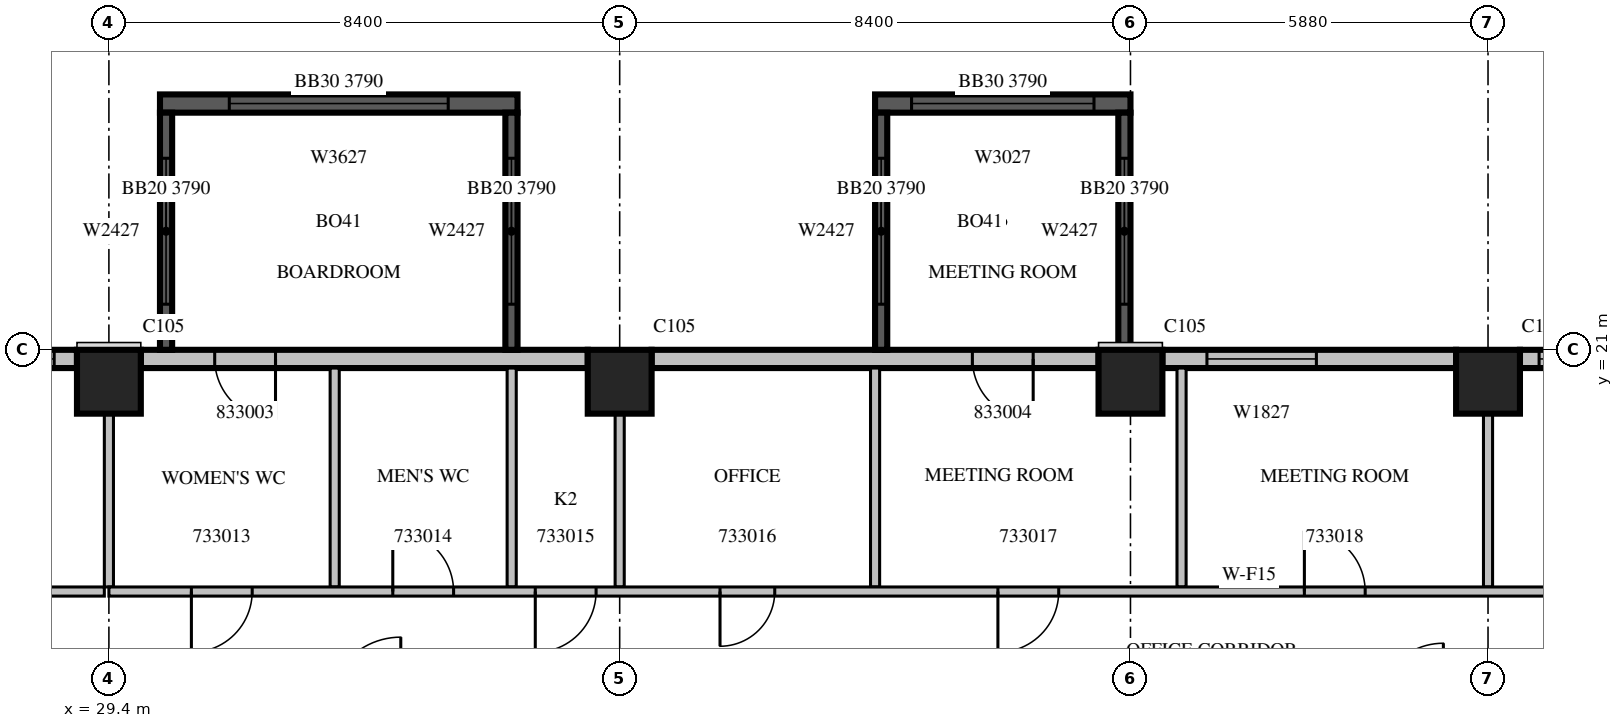
"""IFC4 building model, lengths in metres.
Left out: names, types, materials, properties, quantities, classifications, styles, units other than length and angle.
Written with IfcOpenShell. Run it as: python <this file> out.ifc"""

import sys

from ifc_helpers import new_model, si_unit, direction, frame, frame_2d, origin, origin_2d, place, context, subcontext, project, spatial, rectangle, extrude, source, transform, mapped, element, fill, save


model = new_model("IFC4")
c1 = context("Model", 3, precision=1e-05, world=origin(), true_north=direction((0.0, 1.0)))
c2 = subcontext(c1, "Body", "Model", "MODEL_VIEW")
j1 = project(units=[si_unit("LENGTHUNIT", "METRE"), si_unit("PLANEANGLEUNIT", "RADIAN")], contexts=[c1])
p1 = place(None, origin())
s1 = spatial("IfcSite", under=j1, at=p1, CompositionType="ELEMENT")
p2 = place(p1, origin())
s2 = spatial("IfcBuilding", under=s1, at=p2, CompositionType="ELEMENT")
p3 = place(p2, frame((0.0, 0.0, 149.7)))
s3 = spatial("IfcBuildingStorey", under=s2, at=p3, CompositionType="ELEMENT", Elevation=149.7)
m1 = source(origin(), c2, "Body", "SweptSolid", [
    extrude(rectangle(XDim=1.05, YDim=1.05, at=origin_2d()), origin(), (0.0, 0.0, 1.0), 4.2),
])
for number, where, z_axis, x_axis in (
    (1, (29.4, 20.475, 0.0), (0.0, 0.0, 1.0), (1.0, 0.0, 0.0)),
    (2, (37.8, 20.475, 0.0), (0.0, 0.0, 1.0), (1.0, 0.0, 0.0)),
    (3, (46.2, 20.475, 0.0), (0.0, 0.0, 1.0), (1.0, 0.0, 0.0)),
    (4, (52.08, 20.475, 0.0), (0.0, 0.0, 1.0), (1.0, 0.0, 0.0)),
):
    element("IfcColumn", number, at=place(p3, frame(where, z_axis=z_axis, x_axis=x_axis)), inside=s3, PredefinedType="COLUMN", context=c2, shape_type="MappedRepresentation", body=[
        mapped(m1, transform((0.0, 0.0, 0.0), scale=1.0)),
    ])
m2 = source(origin(), c2, "Body", "SweptSolid", [
    extrude(rectangle(XDim=4.83, YDim=0.3, at=frame_2d((2.415, 0.0))), origin(), (0.0, 0.0, 1.0), 3.8),
])
p4 = place(p3, frame((57.435, 20.85, 0.0), z_axis=(0.0, 0.0, 1.0), x_axis=(-1.0, 0.0, 0.0)))
e5 = element("IfcWall", 5, at=p4, inside=s3, PredefinedType="STANDARD", context=c2, shape_type="MappedRepresentation", body=[
    mapped(m2, transform((0.0, 0.0, 0.0), scale=1.0)),
])
m3 = source(origin(), c2, "Body", "SweptSolid", [
    extrude(rectangle(XDim=4.2, YDim=2.7, at=frame_2d((2.1, 1.35))), frame((0.0, 0.16, 0.0), z_axis=(0.0, -1.0, 0.0), x_axis=(1.0, 0.0, 0.0)), (0.0, 0.0, 1.0), 0.32),
])
p5 = place(p4, frame((0.315, 0.0, 0.6)))
e6 = element("IfcOpeningElement", 6, at=p5, cuts=e5, PredefinedType="OPENING", context=c2, shape_type="MappedRepresentation", body=[
    mapped(m3, transform((0.0, 0.0, 0.0), scale=1.0)),
])
p6 = place(p3, frame((51.555, 20.85, 0.0), z_axis=(0.0, 0.0, 1.0), x_axis=(-1.0, 0.0, 0.0)))
e7 = element("IfcWall", 7, at=p6, inside=s3, PredefinedType="STANDARD", context=c2, shape_type="MappedRepresentation", body=[
    mapped(m2, transform((0.0, 0.0, 0.0), scale=1.0)),
])
m4 = source(origin(), c2, "Body", "SweptSolid", [
    extrude(rectangle(XDim=1.8, YDim=2.7, at=frame_2d((0.9, 1.35))), frame((0.0, 0.16, 0.0), z_axis=(0.0, -1.0, 0.0), x_axis=(1.0, 0.0, 0.0)), (0.0, 0.0, 1.0), 0.32),
])
p7 = place(p6, frame((2.297, 0.0, 0.6)))
e8 = element("IfcOpeningElement", 8, at=p7, cuts=e7, PredefinedType="OPENING", context=c2, shape_type="MappedRepresentation", body=[
    mapped(m4, transform((0.0, 0.0, 0.0), scale=1.0)),
])
m5 = source(origin(), c2, "Body", "SweptSolid", [
    extrude(rectangle(XDim=7.35, YDim=0.3, at=frame_2d((3.675, 0.0))), origin(), (0.0, 0.0, 1.0), 3.8),
])
p8 = place(p3, frame((45.675, 20.85, 0.0), z_axis=(0.0, 0.0, 1.0), x_axis=(-1.0, 0.0, 0.0)))
e9 = element("IfcWall", 9, at=p8, inside=s3, PredefinedType="STANDARD", context=c2, shape_type="MappedRepresentation", body=[
    mapped(m5, transform((0.0, 0.0, 0.0), scale=1.0)),
])
m6 = source(origin(), c2, "Body", "SweptSolid", [
    extrude(rectangle(XDim=1.0, YDim=2.1, at=frame_2d((0.5, 1.05))), frame((0.0, 0.16, 0.0), z_axis=(0.0, -1.0, 0.0), x_axis=(1.0, 0.0, 0.0)), (0.0, 0.0, 1.0), 0.32),
])
p9 = place(p8, frame((1.075, 0.0, 0.0)))
e10 = element("IfcOpeningElement", 10, at=p9, cuts=e9, PredefinedType="OPENING", context=c2, shape_type="MappedRepresentation", body=[
    mapped(m6, transform((0.0, 0.0, 0.0), scale=1.0)),
])
p10 = place(p3, frame((37.275, 20.85, 0.0), z_axis=(0.0, 0.0, 1.0), x_axis=(-1.0, 0.0, 0.0)))
e11 = element("IfcWall", 11, at=p10, inside=s3, PredefinedType="STANDARD", context=c2, shape_type="MappedRepresentation", body=[
    mapped(m5, transform((0.0, 0.0, 0.0), scale=1.0)),
])
p11 = place(p10, frame((5.135, 0.0, 0.0)))
e12 = element("IfcOpeningElement", 12, at=p11, cuts=e11, PredefinedType="OPENING", context=c2, shape_type="MappedRepresentation", body=[
    mapped(m6, transform((0.0, 0.0, 0.0), scale=1.0)),
])
m7 = source(origin(), c2, "Body", "SweptSolid", [
    extrude(rectangle(XDim=6.875, YDim=0.3, at=frame_2d((3.438, 0.0))), origin(), (0.0, 0.0, 1.0), 3.8),
])
p12 = place(p3, frame((28.875, 20.85, 0.0), z_axis=(0.0, 0.0, 1.0), x_axis=(-1.0, 0.0, 0.0)))
e13 = element("IfcWall", 13, at=p12, inside=s3, PredefinedType="STANDARD", context=c2, shape_type="MappedRepresentation", body=[
    mapped(m7, transform((0.0, 0.0, 0.0), scale=1.0)),
])
m8 = source(origin(), c2, "Body", "SweptSolid", [
    extrude(rectangle(XDim=2.4, YDim=2.7, at=frame_2d((1.2, 1.35))), frame((0.0, 0.16, 0.0), z_axis=(0.0, -1.0, 0.0), x_axis=(1.0, 0.0, 0.0)), (0.0, 0.0, 1.0), 0.32),
])
p13 = place(p12, frame((0.375, 0.0, 0.6)))
e14 = element("IfcOpeningElement", 14, at=p13, cuts=e13, PredefinedType="OPENING", context=c2, shape_type="MappedRepresentation", body=[
    mapped(m8, transform((0.0, 0.0, 0.0), scale=1.0)),
])
m9 = source(origin(), c2, "Body", "SweptSolid", [
    extrude(rectangle(XDim=5.88, YDim=0.3, at=frame_2d((2.94, 0.0))), origin(), (0.0, 0.0, 1.0), 3.79),
])
p14 = place(p3, frame((36.12, 25.05, 0.0), z_axis=(0.0, 0.0, 1.0), x_axis=(-1.0, 0.0, 0.0)))
e15 = element("IfcWall", 15, at=p14, inside=s3, PredefinedType="SOLIDWALL", context=c2, shape_type="MappedRepresentation", body=[
    mapped(m9, transform((0.0, 0.0, 0.0), scale=1.0)),
])
m10 = source(origin(), c2, "Body", "SweptSolid", [
    extrude(rectangle(XDim=3.6, YDim=2.7, at=frame_2d((1.8, 1.35))), frame((0.0, 0.16, 0.0), z_axis=(0.0, -1.0, 0.0), x_axis=(1.0, 0.0, 0.0)), (0.0, 0.0, 1.0), 0.32),
])
p15 = place(p14, frame((1.14, 0.0, 0.6)))
e16 = element("IfcOpeningElement", 16, at=p15, cuts=e15, PredefinedType="OPENING", context=c2, shape_type="MappedRepresentation", body=[
    mapped(m10, transform((0.0, 0.0, 0.0), scale=1.0)),
])
m11 = source(origin(), c2, "Body", "SweptSolid", [
    extrude(rectangle(XDim=3.9, YDim=0.2, at=frame_2d((1.95, 0.0))), origin(), (0.0, 0.0, 1.0), 3.79),
])
p16 = place(p3, frame((36.02, 21.0, 0.0), z_axis=(0.0, 0.0, 1.0), x_axis=(0.0, 1.0, 0.0)))
e17 = element("IfcWall", 17, at=p16, inside=s3, PredefinedType="SOLIDWALL", context=c2, shape_type="MappedRepresentation", body=[
    mapped(m11, transform((0.0, 0.0, 0.0), scale=1.0)),
])
m12 = source(origin(), c2, "Body", "SweptSolid", [
    extrude(rectangle(XDim=2.4, YDim=2.7, at=frame_2d((1.2, 1.35))), frame((0.0, 0.11, 0.0), z_axis=(0.0, -1.0, 0.0), x_axis=(1.0, 0.0, 0.0)), (0.0, 0.0, 1.0), 0.22),
])
p17 = place(p16, frame((0.75, 0.0, 0.6)))
e18 = element("IfcOpeningElement", 18, at=p17, cuts=e17, PredefinedType="OPENING", context=c2, shape_type="MappedRepresentation", body=[
    mapped(m12, transform((0.0, 0.0, 0.0), scale=1.0)),
])
p18 = place(p3, frame((30.34, 21.0, 0.0), z_axis=(0.0, 0.0, 1.0), x_axis=(0.0, 1.0, 0.0)))
e19 = element("IfcWall", 19, at=p18, inside=s3, PredefinedType="SOLIDWALL", context=c2, shape_type="MappedRepresentation", body=[
    mapped(m11, transform((0.0, 0.0, 0.0), scale=1.0)),
])
p19 = place(p18, frame((0.75, 0.0, 0.6)))
e20 = element("IfcOpeningElement", 20, at=p19, cuts=e19, PredefinedType="OPENING", context=c2, shape_type="MappedRepresentation", body=[
    mapped(m12, transform((0.0, 0.0, 0.0), scale=1.0)),
])
m13 = source(origin(), c2, "Body", "SweptSolid", [
    extrude(rectangle(XDim=4.2, YDim=0.3, at=frame_2d((2.1, 0.0))), origin(), (0.0, 0.0, 1.0), 3.79),
])
p20 = place(p3, frame((46.2, 25.05, 0.0), z_axis=(0.0, 0.0, 1.0), x_axis=(-1.0, 0.0, 0.0)))
e21 = element("IfcWall", 21, at=p20, inside=s3, PredefinedType="SOLIDWALL", context=c2, shape_type="MappedRepresentation", body=[
    mapped(m13, transform((0.0, 0.0, 0.0), scale=1.0)),
])
m14 = source(origin(), c2, "Body", "SweptSolid", [
    extrude(rectangle(XDim=3.0, YDim=2.7, at=frame_2d((1.5, 1.35))), frame((0.0, 0.16, 0.0), z_axis=(0.0, -1.0, 0.0), x_axis=(1.0, 0.0, 0.0)), (0.0, 0.0, 1.0), 0.32),
])
p21 = place(p20, frame((0.6, 0.0, 0.6)))
e22 = element("IfcOpeningElement", 22, at=p21, cuts=e21, PredefinedType="OPENING", context=c2, shape_type="MappedRepresentation", body=[
    mapped(m14, transform((0.0, 0.0, 0.0), scale=1.0)),
])
p22 = place(p3, frame((46.1, 21.0, 0.0), z_axis=(0.0, 0.0, 1.0), x_axis=(0.0, 1.0, 0.0)))
e23 = element("IfcWall", 23, at=p22, inside=s3, PredefinedType="SOLIDWALL", context=c2, shape_type="MappedRepresentation", body=[
    mapped(m11, transform((0.0, 0.0, 0.0), scale=1.0)),
])
p23 = place(p22, frame((0.75, 0.0, 0.6)))
e24 = element("IfcOpeningElement", 24, at=p23, cuts=e23, PredefinedType="OPENING", context=c2, shape_type="MappedRepresentation", body=[
    mapped(m12, transform((0.0, 0.0, 0.0), scale=1.0)),
])
p24 = place(p3, frame((42.1, 21.0, 0.0), z_axis=(0.0, 0.0, 1.0), x_axis=(0.0, 1.0, 0.0)))
e25 = element("IfcWall", 25, at=p24, inside=s3, PredefinedType="SOLIDWALL", context=c2, shape_type="MappedRepresentation", body=[
    mapped(m11, transform((0.0, 0.0, 0.0), scale=1.0)),
])
p25 = place(p24, frame((0.75, 0.0, 0.6)))
e26 = element("IfcOpeningElement", 26, at=p25, cuts=e25, PredefinedType="OPENING", context=c2, shape_type="MappedRepresentation", body=[
    mapped(m12, transform((0.0, 0.0, 0.0), scale=1.0)),
])
m15 = source(origin(), c2, "Body", "SweptSolid", [
    extrude(rectangle(XDim=5.35, YDim=0.15, at=frame_2d((2.675, 0.0))), origin(), (0.0, 0.0, 1.0), 3.8),
])
p26 = place(p3, frame((23.975, 17.025, 0.0), z_axis=(0.0, 0.0, 1.0), x_axis=(1.0, 0.0, 0.0)))
e27 = element("IfcWall", 27, at=p26, inside=s3, PredefinedType="PARTITIONING", context=c2, shape_type="MappedRepresentation", body=[
    mapped(m15, transform((0.0, 0.0, 0.0), scale=1.0)),
])
m16 = source(origin(), c2, "Body", "SweptSolid", [
    extrude(rectangle(XDim=2.851, YDim=0.15, at=frame_2d((1.425, 0.0))), origin(), (0.0, 0.0, 1.0), 3.8),
])
p27 = place(p3, frame((29.4, 17.1, 0.0), z_axis=(0.0, 0.0, 1.0), x_axis=(0.0, 1.0, 0.0)))
e28 = element("IfcWall", 28, at=p27, inside=s3, PredefinedType="PARTITIONING", context=c2, shape_type="MappedRepresentation", body=[
    mapped(m16, transform((0.0, 0.0, 0.0), scale=1.0)),
])
m17 = source(origin(), c2, "Body", "SweptSolid", [
    extrude(rectangle(XDim=3.6, YDim=0.15, at=frame_2d((1.8, 0.0))), origin(), (0.0, 0.0, 1.0), 3.8),
])
for number, where, z_axis, x_axis in (
    (29, (33.113, 20.7, 0.0), (0.0, 0.0, 1.0), (0.0, -1.0, 0.0)),
    (30, (36.024, 20.7, 0.0), (0.0, 0.0, 1.0), (0.0, -1.0, 0.0)),
    (31, (47.04, 20.7, 0.0), (0.0, 0.0, 1.0), (0.0, -1.0, 0.0)),
):
    element("IfcWall", number, at=place(p3, frame(where, z_axis=z_axis, x_axis=x_axis)), inside=s3, PredefinedType="PARTITIONING", context=c2, shape_type="MappedRepresentation", body=[
        mapped(m17, transform((0.0, 0.0, 0.0), scale=1.0)),
    ])
p28 = place(p3, frame((37.8, 17.1, 0.0), z_axis=(0.0, 0.0, 1.0), x_axis=(0.0, 1.0, 0.0)))
e32 = element("IfcWall", 32, at=p28, inside=s3, PredefinedType="PARTITIONING", context=c2, shape_type="MappedRepresentation", body=[
    mapped(m16, transform((0.0, 0.0, 0.0), scale=1.0)),
])
p29 = place(p3, frame((42.0, 17.1, 0.0), z_axis=(0.0, 0.0, 1.0), x_axis=(0.0, 1.0, 0.0)))
e33 = element("IfcWall", 33, at=p29, inside=s3, PredefinedType="PARTITIONING", context=c2, shape_type="MappedRepresentation", body=[
    mapped(m17, transform((0.0, 0.0, 0.0), scale=1.0)),
])
p30 = place(p3, frame((52.08, 17.1, 0.0), z_axis=(0.0, 0.0, 1.0), x_axis=(0.0, 1.0, 0.0)))
e34 = element("IfcWall", 34, at=p30, inside=s3, PredefinedType="PARTITIONING", context=c2, shape_type="MappedRepresentation", body=[
    mapped(m16, transform((0.0, 0.0, 0.0), scale=1.0)),
])
m18 = source(origin(), c2, "Body", "SweptSolid", [
    extrude(rectangle(XDim=37.5, YDim=0.15, at=frame_2d((18.75, 0.0))), origin(), (0.0, 0.0, 1.0), 3.8),
])
p31 = place(p3, frame((29.4, 17.025, 0.0), z_axis=(0.0, 0.0, 1.0), x_axis=(1.0, 0.0, 0.0)))
e35 = element("IfcWall", 35, at=p31, inside=s3, PredefinedType="PARTITIONING", context=c2, shape_type="MappedRepresentation", body=[
    mapped(m18, transform((0.0, 0.0, 0.0), scale=1.0)),
])
m19 = source(origin(), c2, "Body", "SweptSolid", [
    extrude(rectangle(XDim=1.0, YDim=2.1, at=frame_2d((0.5, 1.05))), frame((0.0, 0.085, 0.0), z_axis=(0.0, -1.0, 0.0), x_axis=(1.0, 0.0, 0.0)), (0.0, 0.0, 1.0), 0.17),
])
p32 = place(p31, frame((1.357, 0.0, 0.0)))
e36 = element("IfcOpeningElement", 36, at=p32, cuts=e35, PredefinedType="OPENING", context=c2, shape_type="MappedRepresentation", body=[
    mapped(m19, transform((0.0, 0.0, 0.0), scale=1.0)),
])
p33 = place(p31, frame((4.669, 0.0, 0.0)))
e37 = element("IfcOpeningElement", 37, at=p33, cuts=e35, PredefinedType="OPENING", context=c2, shape_type="MappedRepresentation", body=[
    mapped(m19, transform((0.0, 0.0, 0.0), scale=1.0)),
])
p34 = place(p31, frame((7.012, 0.0, 0.0)))
e38 = element("IfcOpeningElement", 38, at=p34, cuts=e35, PredefinedType="OPENING", context=c2, shape_type="MappedRepresentation", body=[
    mapped(m19, transform((0.0, 0.0, 0.0), scale=1.0)),
])
m20 = source(origin(), c2, "Body", "SweptSolid", [
    extrude(rectangle(XDim=0.9, YDim=2.1, at=frame_2d((0.45, 1.05))), frame((0.0, 0.085, 0.0), z_axis=(0.0, -1.0, 0.0), x_axis=(1.0, 0.0, 0.0)), (0.0, 0.0, 1.0), 0.17),
])
p35 = place(p31, frame((10.05, 0.0, 0.0)))
e39 = element("IfcOpeningElement", 39, at=p35, cuts=e35, PredefinedType="OPENING", context=c2, shape_type="MappedRepresentation", body=[
    mapped(m20, transform((0.0, 0.0, 0.0), scale=1.0)),
])
p36 = place(p31, frame((14.62, 0.0, 0.0)))
e40 = element("IfcOpeningElement", 40, at=p36, cuts=e35, PredefinedType="OPENING", context=c2, shape_type="MappedRepresentation", body=[
    mapped(m19, transform((0.0, 0.0, 0.0), scale=1.0)),
])
p37 = place(p31, frame((19.66, 0.0, 0.0)))
e41 = element("IfcOpeningElement", 41, at=p37, cuts=e35, PredefinedType="OPENING", context=c2, shape_type="MappedRepresentation", body=[
    mapped(m19, transform((0.0, 0.0, 0.0), scale=1.0)),
])
m21 = source(origin(), c2, "Body", "SweptSolid", [
    extrude(rectangle(XDim=1.2, YDim=2.1, at=frame_2d((0.6, 1.05))), frame((0.0, 0.085, 0.0), z_axis=(0.0, -1.0, 0.0), x_axis=(1.0, 0.0, 0.0)), (0.0, 0.0, 1.0), 0.17),
])
p38 = place(p31, frame((25.804, 0.0, 0.0)))
e42 = element("IfcOpeningElement", 42, at=p38, cuts=e35, PredefinedType="OPENING", context=c2, shape_type="MappedRepresentation", body=[
    mapped(m21, transform((0.0, 0.0, 0.0), scale=1.0)),
])
p39 = place(p31, frame((33.251, 0.0, 0.0)))
e43 = element("IfcOpeningElement", 43, at=p39, cuts=e35, PredefinedType="OPENING", context=c2, shape_type="MappedRepresentation", body=[
    mapped(m21, transform((0.0, 0.0, 0.0), scale=1.0)),
])
m22 = source(origin(), c2, "Body", "SweptSolid", [
    extrude(rectangle(XDim=1.8, YDim=2.7, at=frame_2d((0.9, 1.35))), frame((0.0, 0.03, 0.0), z_axis=(0.0, -1.0, 0.0), x_axis=(1.0, 0.0, 0.0)), (0.0, 0.0, 1.0), 0.06),
])
p40 = place(p7, origin())
e44 = element("IfcWindow", 44, at=p40, inside=s3, PartitioningType="SINGLE_PANEL", PredefinedType="WINDOW", context=c2, shape_type="MappedRepresentation", body=[
    mapped(m22, transform((0.0, 0.0, 0.0), scale=1.0)),
])
fill(e8, e44)
m23 = source(origin(), c2, "Body", "SweptSolid", [
    extrude(rectangle(XDim=4.2, YDim=2.7, at=frame_2d((2.1, 1.35))), frame((0.0, 0.03, 0.0), z_axis=(0.0, -1.0, 0.0), x_axis=(1.0, 0.0, 0.0)), (0.0, 0.0, 1.0), 0.06),
])
p41 = place(p5, origin())
e45 = element("IfcWindow", 45, at=p41, inside=s3, PartitioningType="SINGLE_PANEL", PredefinedType="WINDOW", context=c2, shape_type="MappedRepresentation", body=[
    mapped(m23, transform((0.0, 0.0, 0.0), scale=1.0)),
])
fill(e6, e45)
m24 = source(origin(), c2, "Body", "SweptSolid", [
    extrude(rectangle(XDim=2.4, YDim=2.7, at=frame_2d((1.2, 1.35))), frame((0.0, 0.03, 0.0), z_axis=(0.0, -1.0, 0.0), x_axis=(1.0, 0.0, 0.0)), (0.0, 0.0, 1.0), 0.06),
])
p42 = place(p13, origin())
e46 = element("IfcWindow", 46, at=p42, inside=s3, PartitioningType="SINGLE_PANEL", PredefinedType="WINDOW", context=c2, shape_type="MappedRepresentation", body=[
    mapped(m24, transform((0.0, 0.0, 0.0), scale=1.0)),
])
fill(e14, e46)
m25 = source(origin(), c2, "Body", "SweptSolid", [
    extrude(rectangle(XDim=3.6, YDim=2.7, at=frame_2d((1.8, 1.35))), frame((0.0, 0.03, 0.0), z_axis=(0.0, -1.0, 0.0), x_axis=(1.0, 0.0, 0.0)), (0.0, 0.0, 1.0), 0.06),
])
p43 = place(p15, origin())
e47 = element("IfcWindow", 47, at=p43, inside=s3, PartitioningType="SINGLE_PANEL", PredefinedType="WINDOW", context=c2, shape_type="MappedRepresentation", body=[
    mapped(m25, transform((0.0, 0.0, 0.0), scale=1.0)),
])
fill(e16, e47)
p44 = place(p17, origin())
e48 = element("IfcWindow", 48, at=p44, inside=s3, PartitioningType="SINGLE_PANEL", PredefinedType="WINDOW", context=c2, shape_type="MappedRepresentation", body=[
    mapped(m24, transform((0.0, 0.0, 0.0), scale=1.0)),
])
fill(e18, e48)
p45 = place(p19, origin())
e49 = element("IfcWindow", 49, at=p45, inside=s3, PartitioningType="SINGLE_PANEL", PredefinedType="WINDOW", context=c2, shape_type="MappedRepresentation", body=[
    mapped(m24, transform((0.0, 0.0, 0.0), scale=1.0)),
])
fill(e20, e49)
m26 = source(origin(), c2, "Body", "SweptSolid", [
    extrude(rectangle(XDim=3.0, YDim=2.7, at=frame_2d((1.5, 1.35))), frame((0.0, 0.03, 0.0), z_axis=(0.0, -1.0, 0.0), x_axis=(1.0, 0.0, 0.0)), (0.0, 0.0, 1.0), 0.06),
])
p46 = place(p21, origin())
e50 = element("IfcWindow", 50, at=p46, inside=s3, PartitioningType="SINGLE_PANEL", PredefinedType="WINDOW", context=c2, shape_type="MappedRepresentation", body=[
    mapped(m26, transform((0.0, 0.0, 0.0), scale=1.0)),
])
fill(e22, e50)
p47 = place(p23, origin())
e51 = element("IfcWindow", 51, at=p47, inside=s3, PartitioningType="SINGLE_PANEL", PredefinedType="WINDOW", context=c2, shape_type="MappedRepresentation", body=[
    mapped(m24, transform((0.0, 0.0, 0.0), scale=1.0)),
])
fill(e24, e51)
p48 = place(p25, origin())
e52 = element("IfcWindow", 52, at=p48, inside=s3, PartitioningType="SINGLE_PANEL", PredefinedType="WINDOW", context=c2, shape_type="MappedRepresentation", body=[
    mapped(m24, transform((0.0, 0.0, 0.0), scale=1.0)),
])
fill(e26, e52)
m27 = source(origin(), c2, "Body", "SweptSolid", [
    extrude(rectangle(XDim=1.0, YDim=2.1, at=frame_2d((0.5, 1.05))), frame((0.0, 0.025, 0.0), z_axis=(0.0, -1.0, 0.0), x_axis=(1.0, 0.0, 0.0)), (0.0, 0.0, 1.0), 0.05),
])
p49 = place(p32, origin())
e53 = element("IfcDoor", 53, at=p49, inside=s3, OperationType="SINGLE_SWING_RIGHT", PredefinedType="DOOR", context=c2, shape_type="MappedRepresentation", body=[
    mapped(m27, transform((0.0, 0.0, 0.0), scale=1.0)),
])
fill(e36, e53)
p50 = place(p33, origin())
e54 = element("IfcDoor", 54, at=p50, inside=s3, OperationType="SINGLE_SWING_LEFT", PredefinedType="DOOR", context=c2, shape_type="MappedRepresentation", body=[
    mapped(m27, transform((0.0, 0.0, 0.0), scale=1.0)),
])
fill(e37, e54)
p51 = place(p34, origin())
e55 = element("IfcDoor", 55, at=p51, inside=s3, OperationType="SINGLE_SWING_RIGHT", PredefinedType="DOOR", context=c2, shape_type="MappedRepresentation", body=[
    mapped(m27, transform((0.0, 0.0, 0.0), scale=1.0)),
])
fill(e38, e55)
m28 = source(origin(), c2, "Body", "SweptSolid", [
    extrude(rectangle(XDim=0.9, YDim=2.1, at=frame_2d((0.45, 1.05))), frame((0.0, 0.025, 0.0), z_axis=(0.0, -1.0, 0.0), x_axis=(1.0, 0.0, 0.0)), (0.0, 0.0, 1.0), 0.05),
])
p52 = place(p35, origin())
e56 = element("IfcDoor", 56, at=p52, inside=s3, OperationType="SINGLE_SWING_RIGHT", PredefinedType="DOOR", context=c2, shape_type="MappedRepresentation", body=[
    mapped(m28, transform((0.0, 0.0, 0.0), scale=1.0)),
])
fill(e39, e56)
p53 = place(p36, origin())
e57 = element("IfcDoor", 57, at=p53, inside=s3, OperationType="SINGLE_SWING_RIGHT", PredefinedType="DOOR", context=c2, shape_type="MappedRepresentation", body=[
    mapped(m27, transform((0.0, 0.0, 0.0), scale=1.0)),
])
fill(e40, e57)
p54 = place(p37, origin())
e58 = element("IfcDoor", 58, at=p54, inside=s3, OperationType="SINGLE_SWING_LEFT", PredefinedType="DOOR", context=c2, shape_type="MappedRepresentation", body=[
    mapped(m27, transform((0.0, 0.0, 0.0), scale=1.0)),
])
fill(e41, e58)
p55 = place(p11, origin())
e59 = element("IfcDoor", 59, at=p55, inside=s3, OperationType="SINGLE_SWING_LEFT", PredefinedType="DOOR", context=c2, shape_type="MappedRepresentation", body=[
    mapped(m27, transform((0.0, 0.0, 0.0), scale=1.0)),
])
fill(e12, e59)
p56 = place(p9, origin())
e60 = element("IfcDoor", 60, at=p56, inside=s3, OperationType="SINGLE_SWING_LEFT", PredefinedType="DOOR", context=c2, shape_type="MappedRepresentation", body=[
    mapped(m27, transform((0.0, 0.0, 0.0), scale=1.0)),
])
fill(e10, e60)
save(model, sys.argv[1])
